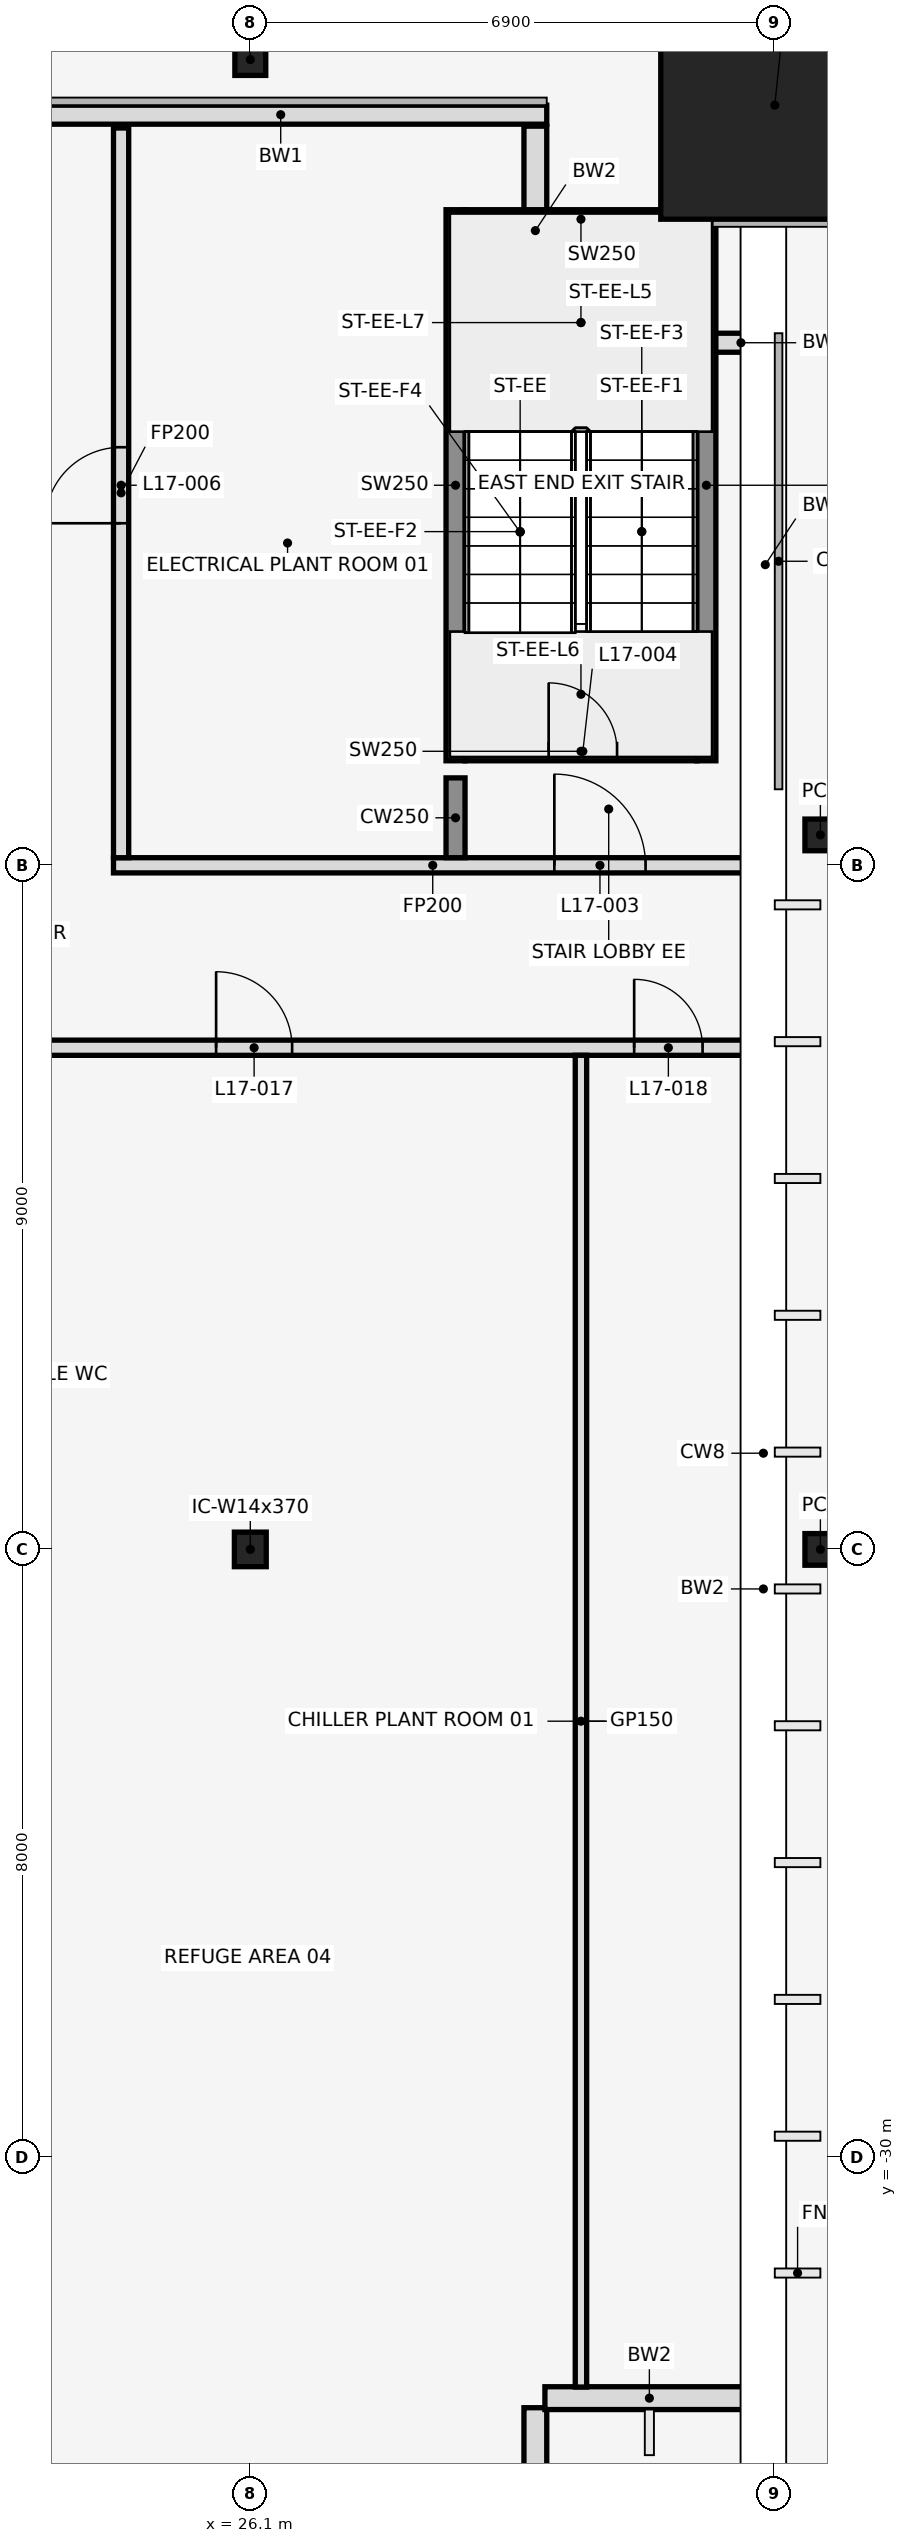
"""IFC4 building model, lengths in metres.
Left out: names, types, materials, properties, quantities, classifications, styles, units other than length and angle.
Written with IfcOpenShell. Run it as: python <this file> out.ifc"""

import sys

from ifc_helpers import new_model, si_unit, direction, frame, frame_2d, origin, origin_2d, place, context, subcontext, project, spatial, rectangle, hollow_rectangle, i_section, extrude, element, fill, save


model = new_model("IFC4")
c1 = context("Model", 3, precision=1e-05, world=origin(), true_north=direction((0.0, 1.0)))
c2 = subcontext(c1, "Body", "Model", "MODEL_VIEW")
j1 = project(units=[si_unit("LENGTHUNIT", "METRE"), si_unit("PLANEANGLEUNIT", "RADIAN")], contexts=[c1])
p1 = place(None, origin())
s1 = spatial("IfcSite", under=j1, at=p1, CompositionType="ELEMENT")
p2 = place(p1, origin())
s2 = spatial("IfcBuilding", under=s1, at=p2, CompositionType="ELEMENT")
p3 = place(p2, frame((0.0, 0.0, 84.5)))
s3 = spatial("IfcBuildingStorey", under=s2, at=p3, CompositionType="ELEMENT", Elevation=84.5)
p4 = place(p3, frame((26.1, -2.4, 0.0), z_axis=(0.0, 0.0, 1.0), x_axis=(1.0, 0.0, 0.0)))
e1 = element("IfcColumn", 1, at=p4, inside=s3, PredefinedType="COLUMN", context=c2, shape_type="SweptSolid", body=[
    extrude(i_section(OverallWidth=0.406, OverallDepth=0.417, WebThickness=0.03, FlangeThickness=0.048, at=origin_2d()), origin(), (0.0, 0.0, 1.0), 5.4),
])
p5 = place(p3, frame((33.0, -3.0, 0.0), z_axis=(0.0, 0.0, 1.0), x_axis=(1.0, 0.0, 0.0)))
e2 = element("IfcColumn", 2, at=p5, inside=s3, PredefinedType="COLUMN", context=c2, shape_type="SweptSolid", body=[
    extrude(hollow_rectangle(XDim=3.0, YDim=3.0, WallThickness=0.1, at=origin_2d()), origin(), (0.0, 0.0, 1.0), 5.4),
])
for number, where, z_axis, x_axis in (
    (3, (33.6, -12.6, 0.0), (0.0, 0.0, 1.0), (1.0, 0.0, 0.0)),
    (4, (33.6, -22.0, 0.0), (0.0, 0.0, 1.0), (1.0, 0.0, 0.0)),
):
    element("IfcColumn", number, at=place(p3, frame(where, z_axis=z_axis, x_axis=x_axis)), inside=s3, PredefinedType="COLUMN", context=c2, shape_type="SweptSolid", body=[
        extrude(i_section(OverallWidth=0.406, OverallDepth=0.417, WebThickness=0.03, FlangeThickness=0.048, at=origin_2d()), origin(), (0.0, 0.0, 1.0), 5.4),
    ])
p6 = place(p3, frame((26.1, -22.0, 0.0), z_axis=(0.0, 0.0, 1.0), x_axis=(1.0, 0.0, 0.0)))
e5 = element("IfcColumn", 5, at=p6, inside=s3, PredefinedType="COLUMN", context=c2, shape_type="SweptSolid", body=[
    extrude(i_section(OverallWidth=0.419, OverallDepth=0.455, WebThickness=0.042, FlangeThickness=0.068, at=origin_2d()), origin(), (0.0, 0.0, 1.0), 5.4),
])
p7 = place(p3, frame((32.85, -33.04, 0.0), z_axis=(0.0, 0.0, 1.0), x_axis=(0.0, 1.0, 0.0)))
e6 = element("IfcWall", 6, at=p7, inside=s3, PredefinedType="STANDARD", context=c2, shape_type="SweptSolid", body=[
    extrude(rectangle(XDim=21.04, YDim=0.3, at=frame_2d((10.52, 0.0))), origin(), (0.0, 0.0, 1.0), 4.338),
])
p8 = place(p3, frame((29.85, -6.024, 0.0), z_axis=(0.0, 0.0, 1.0), x_axis=(0.0, 1.0, 0.0)))
e7 = element("IfcWall", 7, at=p8, inside=s3, PredefinedType="STANDARD", context=c2, shape_type="SweptSolid", body=[
    extrude(rectangle(XDim=2.748, YDim=0.3, at=frame_2d((1.374, 0.0))), origin(), (0.0, 0.0, 1.0), 5.25),
])
p9 = place(p3, frame((29.85, -36.04, 0.0), z_axis=(0.0, 0.0, 1.0), x_axis=(0.0, 1.0, 0.0)))
e8 = element("IfcWall", 8, at=p9, inside=s3, PredefinedType="STANDARD", context=c2, shape_type="SweptSolid", body=[
    extrude(rectangle(XDim=2.748, YDim=0.3, at=frame_2d((1.374, 0.0))), origin(), (0.0, 0.0, 1.0), 4.572),
])
p10 = place(p3, frame((29.976, -33.166, 0.0), z_axis=(0.0, 0.0, 1.0), x_axis=(1.0, 0.0, 0.0)))
e9 = element("IfcWall", 9, at=p10, inside=s3, PredefinedType="STANDARD", context=c2, shape_type="SweptSolid", body=[
    extrude(rectangle(XDim=2.748, YDim=0.3, at=frame_2d((1.374, 0.0))), origin(), (0.0, 0.0, 1.0), 4.572),
])
p11 = place(p3, frame((32.875, -12.09, 0.0), z_axis=(0.0, 0.0, 1.0), x_axis=(0.0, 1.0, 0.0)))
e10 = element("IfcWall", 10, at=p11, inside=s3, PredefinedType="STANDARD", context=c2, shape_type="SweptSolid", body=[
    extrude(rectangle(XDim=6.09, YDim=0.25, at=frame_2d((3.045, 0.0))), origin(), (0.0, 0.0, 1.0), 5.25),
])
p12 = place(p3, frame((33.0, -6.125, 0.0), z_axis=(0.0, 0.0, 1.0), x_axis=(-1.0, 0.0, 0.0)))
e11 = element("IfcWall", 11, at=p12, inside=s3, PredefinedType="STANDARD", context=c2, shape_type="SweptSolid", body=[
    extrude(rectangle(XDim=0.89, YDim=0.25, at=frame_2d((0.445, 0.0))), origin(), (0.0, 0.0, 1.0), 5.25),
])
p13 = place(p3, frame((30.0, -3.125, 0.0), z_axis=(0.0, 0.0, 1.0), x_axis=(-1.0, 0.0, 0.0)))
e12 = element("IfcWall", 12, at=p13, inside=s3, PredefinedType="STANDARD", context=c2, shape_type="SweptSolid", body=[
    extrude(rectangle(XDim=7.0, YDim=0.25, at=frame_2d((3.5, 0.0))), origin(), (0.0, 0.0, 1.0), 5.25),
])
for number, where, z_axis, x_axis in (
    (13, (28.8, -11.625, 0.0), (0.0, 0.0, 1.0), (0.0, 1.0, 0.0)),
    (14, (32.1, -11.625, 0.0), (0.0, 0.0, 1.0), (0.0, 1.0, 0.0)),
):
    element("IfcWall", number, at=place(p3, frame(where, z_axis=z_axis, x_axis=x_axis)), inside=s3, PredefinedType="SHEAR", context=c2, shape_type="SweptSolid", body=[
        extrude(rectangle(XDim=7.25, YDim=0.25, at=frame_2d((3.625, 0.0))), origin(), (0.0, 0.0, 1.0), 5.4),
    ])
p14 = place(p3, frame((28.925, -11.5, 0.0), z_axis=(0.0, 0.0, 1.0), x_axis=(1.0, 0.0, 0.0)))
e15 = element("IfcWall", 15, at=p14, inside=s3, PredefinedType="SHEAR", context=c2, shape_type="SweptSolid", body=[
    extrude(rectangle(XDim=3.05, YDim=0.25, at=frame_2d((1.525, 0.0))), origin(), (0.0, 0.0, 1.0), 5.4),
])
p15 = place(p14, frame((1.1, 0.0, 0.0)))
e16 = element("IfcOpeningElement", 16, at=p15, cuts=e15, PredefinedType="OPENING", context=c2, shape_type="SweptSolid", body=[
    extrude(rectangle(XDim=0.9, YDim=2.1, at=frame_2d((0.45, 1.05))), frame((0.0, 0.137, 0.0), z_axis=(0.0, -1.0, 0.0), x_axis=(1.0, 0.0, 0.0)), (0.0, 0.0, 1.0), 0.274),
])
p16 = place(p3, frame((28.925, -4.5, 0.0), z_axis=(0.0, 0.0, 1.0), x_axis=(1.0, 0.0, 0.0)))
e17 = element("IfcWall", 17, at=p16, inside=s3, PredefinedType="SHEAR", context=c2, shape_type="SweptSolid", body=[
    extrude(rectangle(XDim=3.05, YDim=0.25, at=frame_2d((1.525, 0.0))), origin(), (0.0, 0.0, 1.0), 5.4),
])
p17 = place(p3, frame((-32.7, -15.4, 0.0), z_axis=(0.0, 0.0, 1.0), x_axis=(1.0, 0.0, 0.0)))
e18 = element("IfcWall", 18, at=p17, inside=s3, PredefinedType="PARTITIONING", context=c2, shape_type="SweptSolid", body=[
    extrude(rectangle(XDim=65.4, YDim=0.2, at=frame_2d((32.7, 0.0))), origin(), (0.0, 0.0, 1.0), 4.318),
])
p18 = place(p17, frame((0.7, 0.0, 0.0)))
e19 = element("IfcOpeningElement", 19, at=p18, cuts=e18, PredefinedType="OPENING", context=c2, shape_type="SweptSolid", body=[
    extrude(rectangle(XDim=0.9, YDim=2.1, at=frame_2d((0.45, 1.05))), frame((0.0, 0.112, 0.0), z_axis=(0.0, -1.0, 0.0), x_axis=(1.0, 0.0, 0.0)), (0.0, 0.0, 1.0), 0.224),
])
p19 = place(p17, frame((6.05, 0.0, 0.0)))
e20 = element("IfcOpeningElement", 20, at=p19, cuts=e18, PredefinedType="OPENING", context=c2, shape_type="SweptSolid", body=[
    extrude(rectangle(XDim=1.0, YDim=2.1, at=frame_2d((0.5, 1.05))), frame((0.0, 0.112, 0.0), z_axis=(0.0, -1.0, 0.0), x_axis=(1.0, 0.0, 0.0)), (0.0, 0.0, 1.0), 0.224),
])
p20 = place(p17, frame((14.85, 0.0, 0.0)))
e21 = element("IfcOpeningElement", 21, at=p20, cuts=e18, PredefinedType="OPENING", context=c2, shape_type="SweptSolid", body=[
    extrude(rectangle(XDim=1.0, YDim=2.1, at=frame_2d((0.5, 1.05))), frame((0.0, 0.112, 0.0), z_axis=(0.0, -1.0, 0.0), x_axis=(1.0, 0.0, 0.0)), (0.0, 0.0, 1.0), 0.224),
])
p21 = place(p17, frame((23.55, 0.0, 0.0)))
e22 = element("IfcOpeningElement", 22, at=p21, cuts=e18, PredefinedType="OPENING", context=c2, shape_type="SweptSolid", body=[
    extrude(rectangle(XDim=1.0, YDim=2.1, at=frame_2d((0.5, 1.05))), frame((0.0, 0.112, 0.0), z_axis=(0.0, -1.0, 0.0), x_axis=(1.0, 0.0, 0.0)), (0.0, 0.0, 1.0), 0.224),
])
p22 = place(p17, frame((32.15, 0.0, 0.0)))
e23 = element("IfcOpeningElement", 23, at=p22, cuts=e18, PredefinedType="OPENING", context=c2, shape_type="SweptSolid", body=[
    extrude(rectangle(XDim=1.0, YDim=2.1, at=frame_2d((0.5, 1.05))), frame((0.0, 0.112, 0.0), z_axis=(0.0, -1.0, 0.0), x_axis=(1.0, 0.0, 0.0)), (0.0, 0.0, 1.0), 0.224),
])
p23 = place(p17, frame((40.95, 0.0, 0.0)))
e24 = element("IfcOpeningElement", 24, at=p23, cuts=e18, PredefinedType="OPENING", context=c2, shape_type="SweptSolid", body=[
    extrude(rectangle(XDim=1.0, YDim=2.1, at=frame_2d((0.5, 1.05))), frame((0.0, 0.112, 0.0), z_axis=(0.0, -1.0, 0.0), x_axis=(1.0, 0.0, 0.0)), (0.0, 0.0, 1.0), 0.224),
])
p24 = place(p17, frame((49.65, 0.0, 0.0)))
e25 = element("IfcOpeningElement", 25, at=p24, cuts=e18, PredefinedType="OPENING", context=c2, shape_type="SweptSolid", body=[
    extrude(rectangle(XDim=0.9, YDim=2.1, at=frame_2d((0.45, 1.05))), frame((0.0, 0.112, 0.0), z_axis=(0.0, -1.0, 0.0), x_axis=(1.0, 0.0, 0.0)), (0.0, 0.0, 1.0), 0.224),
])
p25 = place(p17, frame((58.35, 0.0, 0.0)))
e26 = element("IfcOpeningElement", 26, at=p25, cuts=e18, PredefinedType="OPENING", context=c2, shape_type="SweptSolid", body=[
    extrude(rectangle(XDim=1.0, YDim=2.1, at=frame_2d((0.5, 1.05))), frame((0.0, 0.112, 0.0), z_axis=(0.0, -1.0, 0.0), x_axis=(1.0, 0.0, 0.0)), (0.0, 0.0, 1.0), 0.224),
])
p26 = place(p17, frame((63.85, 0.0, 0.0)))
e27 = element("IfcOpeningElement", 27, at=p26, cuts=e18, PredefinedType="OPENING", context=c2, shape_type="SweptSolid", body=[
    extrude(rectangle(XDim=0.9, YDim=2.1, at=frame_2d((0.45, 1.05))), frame((0.0, 0.112, 0.0), z_axis=(0.0, -1.0, 0.0), x_axis=(1.0, 0.0, 0.0)), (0.0, 0.0, 1.0), 0.224),
])
p27 = place(p3, frame((24.3, -13.0, 0.0), z_axis=(0.0, 0.0, 1.0), x_axis=(1.0, 0.0, 0.0)))
e28 = element("IfcWall", 28, at=p27, inside=s3, PredefinedType="PARTITIONING", context=c2, shape_type="SweptSolid", body=[
    extrude(rectangle(XDim=8.4, YDim=0.2, at=frame_2d((4.2, 0.0))), origin(), (0.0, 0.0, 1.0), 4.318),
])
p28 = place(p27, frame((5.8, 0.0, 0.0)))
e29 = element("IfcOpeningElement", 29, at=p28, cuts=e28, PredefinedType="OPENING", context=c2, shape_type="SweptSolid", body=[
    extrude(rectangle(XDim=1.2, YDim=2.1, at=frame_2d((0.6, 1.05))), frame((0.0, 0.112, 0.0), z_axis=(0.0, -1.0, 0.0), x_axis=(1.0, 0.0, 0.0)), (0.0, 0.0, 1.0), 0.224),
])
p29 = place(p3, frame((24.4, -12.9, 0.0), z_axis=(0.0, 0.0, 1.0), x_axis=(0.0, 1.0, 0.0)))
e30 = element("IfcWall", 30, at=p29, inside=s3, PredefinedType="PARTITIONING", context=c2, shape_type="SweptSolid", body=[
    extrude(rectangle(XDim=9.6, YDim=0.2, at=frame_2d((4.8, 0.0))), origin(), (0.0, 0.0, 1.0), 4.318),
])
p30 = place(p29, frame((4.4, 0.0, 0.0)))
e31 = element("IfcOpeningElement", 31, at=p30, cuts=e30, PredefinedType="OPENING", context=c2, shape_type="SweptSolid", body=[
    extrude(rectangle(XDim=1.0, YDim=2.1, at=frame_2d((0.5, 1.05))), frame((0.0, 0.112, 0.0), z_axis=(0.0, -1.0, 0.0), x_axis=(1.0, 0.0, 0.0)), (0.0, 0.0, 1.0), 0.224),
])
p31 = place(p3, frame((28.8, -12.9, 0.0), z_axis=(0.0, 0.0, 1.0), x_axis=(0.0, 1.0, 0.0)))
e32 = element("IfcWall", 32, at=p31, inside=s3, PredefinedType="SHEAR", context=c2, shape_type="SweptSolid", body=[
    extrude(rectangle(XDim=1.05, YDim=0.25, at=frame_2d((0.525, 0.0))), origin(), (0.0, 0.0, 1.0), 5.4),
])
p32 = place(p3, frame((30.45, -33.02, 0.0), z_axis=(0.0, 0.0, 1.0), x_axis=(0.0, 1.0, 0.0)))
e33 = element("IfcWall", 33, at=p32, inside=s3, PredefinedType="PARTITIONING", context=c2, shape_type="SweptSolid", body=[
    extrude(rectangle(XDim=17.52, YDim=0.15, at=frame_2d((8.76, 0.0))), origin(), (0.0, 0.0, 1.0), 4.318),
])
p33 = place(p28, origin())
e34 = element("IfcDoor", 34, at=p33, inside=s3, OperationType="SINGLE_SWING_RIGHT", PredefinedType="DOOR", context=c2, shape_type="SweptSolid", body=[
    extrude(rectangle(XDim=1.2, YDim=2.1, at=frame_2d((0.6, 1.05))), frame((0.0, 0.025, 0.0), z_axis=(0.0, -1.0, 0.0), x_axis=(1.0, 0.0, 0.0)), (0.0, 0.0, 1.0), 0.05),
])
fill(e29, e34)
p34 = place(p15, origin())
e35 = element("IfcDoor", 35, at=p34, inside=s3, OperationType="SINGLE_SWING_LEFT", PredefinedType="DOOR", context=c2, shape_type="SweptSolid", body=[
    extrude(rectangle(XDim=0.9, YDim=2.1, at=frame_2d((0.45, 1.05))), frame((0.0, 0.025, 0.0), z_axis=(0.0, -1.0, 0.0), x_axis=(1.0, 0.0, 0.0)), (0.0, 0.0, 1.0), 0.05),
])
fill(e16, e35)
p35 = place(p30, frame((1.0, 0.0, 0.0), z_axis=(0.0, 0.0, 1.0), x_axis=(-1.0, 0.0, 0.0)))
e36 = element("IfcDoor", 36, at=p35, inside=s3, OperationType="SINGLE_SWING_RIGHT", PredefinedType="DOOR", context=c2, shape_type="SweptSolid", body=[
    extrude(rectangle(XDim=1.0, YDim=2.1, at=frame_2d((0.5, 1.05))), frame((0.0, 0.025, 0.0), z_axis=(0.0, -1.0, 0.0), x_axis=(1.0, 0.0, 0.0)), (0.0, 0.0, 1.0), 0.05),
])
fill(e31, e36)
p36 = place(p25, frame((1.0, 0.0, 0.0), z_axis=(0.0, 0.0, 1.0), x_axis=(-1.0, 0.0, 0.0)))
e37 = element("IfcDoor", 37, at=p36, inside=s3, OperationType="SINGLE_SWING_RIGHT", PredefinedType="DOOR", context=c2, shape_type="SweptSolid", body=[
    extrude(rectangle(XDim=1.0, YDim=2.1, at=frame_2d((0.5, 1.05))), frame((0.0, 0.025, 0.0), z_axis=(0.0, -1.0, 0.0), x_axis=(1.0, 0.0, 0.0)), (0.0, 0.0, 1.0), 0.05),
])
fill(e26, e37)
p37 = place(p26, frame((0.9, 0.0, 0.0), z_axis=(0.0, 0.0, 1.0), x_axis=(-1.0, 0.0, 0.0)))
e38 = element("IfcDoor", 38, at=p37, inside=s3, OperationType="SINGLE_SWING_RIGHT", PredefinedType="DOOR", context=c2, shape_type="SweptSolid", body=[
    extrude(rectangle(XDim=0.9, YDim=2.1, at=frame_2d((0.45, 1.05))), frame((0.0, 0.025, 0.0), z_axis=(0.0, -1.0, 0.0), x_axis=(1.0, 0.0, 0.0)), (0.0, 0.0, 1.0), 0.05),
])
fill(e27, e38)
save(model, sys.argv[1])
